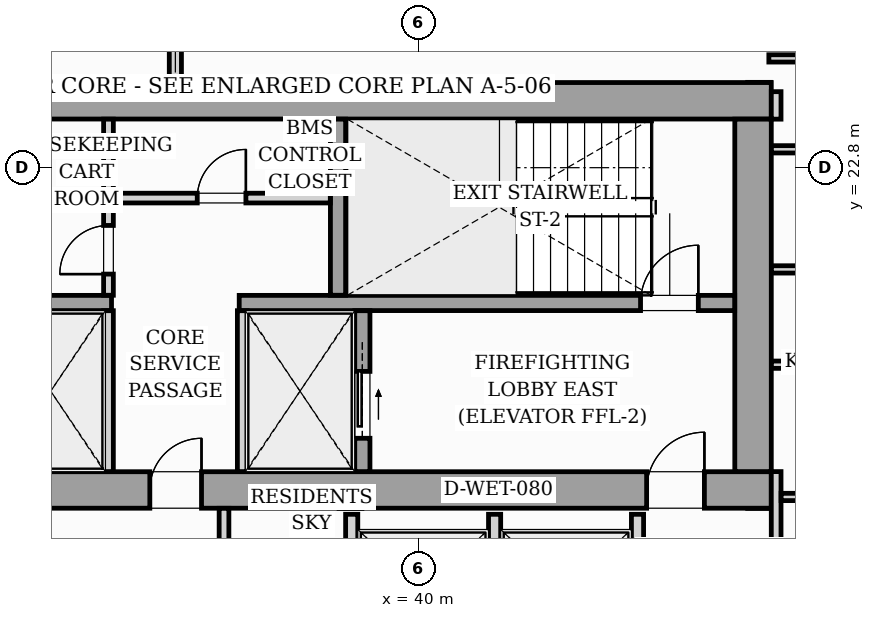
"""IFC4 building model, lengths in metres.
Left out: names, types, materials, properties, quantities, classifications, styles, units other than length and angle.
Written with IfcOpenShell. Run it as: python <this file> out.ifc"""

import sys

from ifc_helpers import new_model, si_unit, direction, frame, frame_2d, origin, origin_2d, place, context, subcontext, project, spatial, rectangle, i_section, extrude, source, transform, mapped, element, fill, save


model = new_model("IFC4")
c1 = context("Model", 3, precision=1e-05, world=origin(), true_north=direction((0.0, 1.0)))
c2 = subcontext(c1, "Body", "Model", "MODEL_VIEW")
j1 = project(units=[si_unit("LENGTHUNIT", "METRE"), si_unit("PLANEANGLEUNIT", "RADIAN")], contexts=[c1])
p1 = place(None, origin())
s1 = spatial("IfcSite", under=j1, at=p1, CompositionType="ELEMENT")
p2 = place(p1, origin())
s2 = spatial("IfcBuilding", under=s1, at=p2, CompositionType="ELEMENT")
p3 = place(p2, frame((0.0, 0.0, 198.6)))
s3 = spatial("IfcBuildingStorey", under=s2, at=p3, CompositionType="ELEMENT", Elevation=198.6)
m1 = source(origin(), c2, "Body", "SweptSolid", [
    extrude(i_section(OverallWidth=0.416, OverallDepth=0.446, WebThickness=0.039, FlangeThickness=0.063, FilletRadius=0.018, at=origin_2d()), origin(), (0.0, 0.0, 1.0), 3.196),
])
for number, where, z_axis, x_axis in (
    (1, (38.88, 17.4, 0.002), (0.0, 0.0, 1.0), (1.0, 0.0, 0.0)),
    (2, (45.6, 17.4, 0.002), (0.0, 0.0, 1.0), (1.0, 0.0, 0.0)),
    (3, (38.88, 24.0, 0.002), (0.0, 0.0, 1.0), (1.0, 0.0, 0.0)),
    (4, (45.6, 24.0, 0.002), (0.0, 0.0, 1.0), (1.0, 0.0, 0.0)),
):
    element("IfcColumn", number, at=place(p3, frame(where, z_axis=z_axis, x_axis=x_axis)), inside=s3, PredefinedType="PILASTER", context=c2, shape_type="MappedRepresentation", body=[
        mapped(m1, transform((0.0, 0.0, 0.0), scale=1.0)),
    ])
p4 = place(p3, frame((26.2, 17.5, 0.0), z_axis=(0.0, 0.0, 1.0), x_axis=(1.0, 0.0, 0.0)))
e5 = element("IfcWall", 5, at=p4, inside=s3, PredefinedType="SHEAR", context=c2, shape_type="SweptSolid", body=[
    extrude(rectangle(XDim=19.6, YDim=0.6, at=frame_2d((9.8, 0.0))), origin(), (0.0, 0.0, 1.0), 3.2),
])
p5 = place(p4, frame((0.95, 0.0, 0.0)))
e6 = element("IfcOpeningElement", 6, at=p5, cuts=e5, PredefinedType="OPENING", context=c2, shape_type="SweptSolid", body=[
    extrude(rectangle(XDim=0.95, YDim=2.06, at=frame_2d((0.475, 1.03))), frame((0.0, 0.31, 0.0), z_axis=(0.0, -1.0, 0.0), x_axis=(1.0, 0.0, 0.0)), (0.0, 0.0, 1.0), 0.62),
])
p6 = place(p4, frame((9.38, 0.0, 0.0)))
e7 = element("IfcOpeningElement", 7, at=p6, cuts=e5, PredefinedType="OPENING", context=c2, shape_type="SweptSolid", body=[
    extrude(rectangle(XDim=0.85, YDim=2.0, at=frame_2d((0.425, 1.0))), frame((0.0, 0.31, 0.0), z_axis=(0.0, -1.0, 0.0), x_axis=(1.0, 0.0, 0.0)), (0.0, 0.0, 1.0), 0.62),
])
p7 = place(p4, frame((17.55, 0.0, 0.0)))
e8 = element("IfcOpeningElement", 8, at=p7, cuts=e5, PredefinedType="OPENING", context=c2, shape_type="SweptSolid", body=[
    extrude(rectangle(XDim=0.95, YDim=2.06, at=frame_2d((0.475, 1.03))), frame((0.0, 0.31, 0.0), z_axis=(0.0, -1.0, 0.0), x_axis=(1.0, 0.0, 0.0)), (0.0, 0.0, 1.0), 0.62),
])
p8 = place(p3, frame((26.2, 23.9, 0.0), z_axis=(0.0, 0.0, 1.0), x_axis=(1.0, 0.0, 0.0)))
e9 = element("IfcWall", 9, at=p8, inside=s3, PredefinedType="SHEAR", context=c2, shape_type="SweptSolid", body=[
    extrude(rectangle(XDim=19.6, YDim=0.6, at=frame_2d((9.8, 0.0))), origin(), (0.0, 0.0, 1.0), 3.2),
])
p9 = place(p3, frame((45.5, 17.802, 0.0), z_axis=(0.0, 0.0, 1.0), x_axis=(0.0, 1.0, 0.0)))
e10 = element("IfcWall", 10, at=p9, inside=s3, PredefinedType="SHEAR", context=c2, shape_type="SweptSolid", body=[
    extrude(rectangle(XDim=5.796, YDim=0.6, at=frame_2d((2.898, 0.0))), origin(), (0.0, 0.0, 1.0), 3.2),
])
p10 = place(p3, frame((26.802, 20.575, 0.0), z_axis=(0.0, 0.0, 1.0), x_axis=(1.0, 0.0, 0.0)))
e11 = element("IfcWall", 11, at=p10, inside=s3, PredefinedType="SOLIDWALL", context=c2, shape_type="SweptSolid", body=[
    extrude(rectangle(XDim=8.148, YDim=0.25, at=frame_2d((4.074, 0.0))), origin(), (0.0, 0.0, 1.0), 3.2),
])
p11 = place(p10, frame((0.298, 0.0, 0.0)))
e12 = element("IfcOpeningElement", 12, at=p11, cuts=e11, PredefinedType="OPENING", context=c2, shape_type="SweptSolid", body=[
    extrude(rectangle(XDim=0.95, YDim=2.06, at=frame_2d((0.475, 1.03))), frame((0.0, 0.135, 0.0), z_axis=(0.0, -1.0, 0.0), x_axis=(1.0, 0.0, 0.0)), (0.0, 0.0, 1.0), 0.27),
])
p12 = place(p3, frame((37.05, 20.575, 0.0), z_axis=(0.0, 0.0, 1.0), x_axis=(1.0, 0.0, 0.0)))
e13 = element("IfcWall", 13, at=p12, inside=s3, PredefinedType="SOLIDWALL", context=c2, shape_type="SweptSolid", body=[
    extrude(rectangle(XDim=8.148, YDim=0.25, at=frame_2d((4.074, 0.0))), origin(), (0.0, 0.0, 1.0), 3.2),
])
p13 = place(p12, frame((6.6, 0.0, 0.0)))
e14 = element("IfcOpeningElement", 14, at=p13, cuts=e13, PredefinedType="OPENING", context=c2, shape_type="SweptSolid", body=[
    extrude(rectangle(XDim=0.95, YDim=2.06, at=frame_2d((0.475, 1.03))), frame((0.0, 0.135, 0.0), z_axis=(0.0, -1.0, 0.0), x_axis=(1.0, 0.0, 0.0)), (0.0, 0.0, 1.0), 0.27),
])
p14 = place(p3, frame((38.675, 20.702, 0.0), z_axis=(0.0, 0.0, 1.0), x_axis=(0.0, 1.0, 0.0)))
e15 = element("IfcWall", 15, at=p14, inside=s3, PredefinedType="SOLIDWALL", context=c2, shape_type="SweptSolid", body=[
    extrude(rectangle(XDim=2.896, YDim=0.25, at=frame_2d((1.448, 0.0))), origin(), (0.0, 0.0, 1.0), 3.2),
])
for number, where, z_axis, x_axis in (
    (16, (34.9, 17.802, 0.0), (0.0, 0.0, 1.0), (0.0, 1.0, 0.0)),
    (17, (37.1, 17.802, 0.0), (0.0, 0.0, 1.0), (0.0, 1.0, 0.0)),
):
    element("IfcWall", number, at=place(p3, frame(where, z_axis=z_axis, x_axis=x_axis)), inside=s3, PredefinedType="PARTITIONING", context=c2, shape_type="SweptSolid", body=[
        extrude(rectangle(XDim=2.646, YDim=0.16, at=frame_2d((1.323, 0.0))), origin(), (0.0, 0.0, 1.0), 2.94),
    ])
p15 = place(p3, frame((39.075, 17.802, 0.0), z_axis=(0.0, 0.0, 1.0), x_axis=(0.0, 1.0, 0.0)))
e18 = element("IfcWall", 18, at=p15, inside=s3, PredefinedType="SOLIDWALL", context=c2, shape_type="SweptSolid", body=[
    extrude(rectangle(XDim=2.646, YDim=0.25, at=frame_2d((1.323, 0.0))), origin(), (0.0, 0.0, 1.0), 3.2),
])
p16 = place(p15, frame((0.548, 0.0, 0.0)))
e19 = element("IfcOpeningElement", 19, at=p16, cuts=e18, PredefinedType="OPENING", context=c2, shape_type="SweptSolid", body=[
    extrude(rectangle(XDim=1.1, YDim=2.08, at=frame_2d((0.55, 1.04))), frame((0.0, 0.135, 0.0), z_axis=(0.0, -1.0, 0.0), x_axis=(1.0, 0.0, 0.0)), (0.0, 0.0, 1.0), 0.27),
])
p17 = place(p3, frame((34.9, 20.702, 0.0), z_axis=(0.0, 0.0, 1.0), x_axis=(0.0, 1.0, 0.0)))
e20 = element("IfcWall", 20, at=p17, inside=s3, PredefinedType="PARTITIONING", context=c2, shape_type="SweptSolid", body=[
    extrude(rectangle(XDim=2.896, YDim=0.16, at=frame_2d((1.448, 0.0))), origin(), (0.0, 0.0, 1.0), 2.94),
])
p18 = place(p17, frame((0.348, 0.0, 0.0)))
e21 = element("IfcOpeningElement", 21, at=p18, cuts=e20, PredefinedType="OPENING", context=c2, shape_type="SweptSolid", body=[
    extrude(rectangle(XDim=0.8, YDim=2.05, at=frame_2d((0.4, 1.025))), frame((0.0, 0.09, 0.0), z_axis=(0.0, -1.0, 0.0), x_axis=(1.0, 0.0, 0.0)), (0.0, 0.0, 1.0), 0.18),
])
p19 = place(p3, frame((34.982, 22.3, 0.0), z_axis=(0.0, 0.0, 1.0), x_axis=(1.0, 0.0, 0.0)))
e22 = element("IfcWall", 22, at=p19, inside=s3, PredefinedType="PARTITIONING", context=c2, shape_type="SweptSolid", body=[
    extrude(rectangle(XDim=3.566, YDim=0.16, at=frame_2d((1.783, 0.0))), origin(), (0.0, 0.0, 1.0), 2.94),
])
p20 = place(p19, frame((1.378, 0.0, 0.0)))
e23 = element("IfcOpeningElement", 23, at=p20, cuts=e22, PredefinedType="OPENING", context=c2, shape_type="SweptSolid", body=[
    extrude(rectangle(XDim=0.8, YDim=2.05, at=frame_2d((0.4, 1.025))), frame((0.0, 0.09, 0.0), z_axis=(0.0, -1.0, 0.0), x_axis=(1.0, 0.0, 0.0)), (0.0, 0.0, 1.0), 0.18),
])
for number, where, z_axis, x_axis in (
    (24, (38.9, 14.75, 0.0), (0.0, 0.0, 1.0), (0.0, 1.0, 0.0)),
    (25, (41.25, 14.75, 0.0), (0.0, 0.0, 1.0), (0.0, 1.0, 0.0)),
    (26, (43.6, 14.75, 0.0), (0.0, 0.0, 1.0), (0.0, 1.0, 0.0)),
):
    element("IfcWall", number, at=place(p3, frame(where, z_axis=z_axis, x_axis=x_axis)), inside=s3, PredefinedType="PARTITIONING", context=c2, shape_type="SweptSolid", body=[
        extrude(rectangle(XDim=2.35, YDim=0.2, at=frame_2d((1.175, 0.0))), origin(), (0.0, 0.0, 1.0), 2.94),
    ])
p21 = place(p3, frame((45.88, 13.442, 0.0), z_axis=(0.0, 0.0, 1.0), x_axis=(0.0, 1.0, 0.0)))
e27 = element("IfcWall", 27, at=p21, inside=s3, PredefinedType="PARTITIONING", context=c2, shape_type="SweptSolid", body=[
    extrude(rectangle(XDim=4.36, YDim=0.16, at=frame_2d((2.18, 0.0))), origin(), (0.0, 0.0, 1.0), 2.94),
])
p22 = place(p21, frame((0.493, 0.0, 0.0)))
e28 = element("IfcOpeningElement", 28, at=p22, cuts=e27, PredefinedType="OPENING", context=c2, shape_type="SweptSolid", body=[
    extrude(rectangle(XDim=0.95, YDim=2.06, at=frame_2d((0.475, 1.03))), frame((0.0, 0.09, 0.0), z_axis=(0.0, -1.0, 0.0), x_axis=(1.0, 0.0, 0.0)), (0.0, 0.0, 1.0), 0.18),
])
p23 = place(p3, frame((45.88, 23.598, 0.0), z_axis=(0.0, 0.0, 1.0), x_axis=(0.0, 1.0, 0.0)))
e29 = element("IfcWall", 29, at=p23, inside=s3, PredefinedType="PARTITIONING", context=c2, shape_type="SweptSolid", body=[
    extrude(rectangle(XDim=0.452, YDim=0.16, at=frame_2d((0.226, 0.0))), origin(), (0.0, 0.0, 1.0), 2.94),
])
p24 = place(p3, frame((36.0, 24.202, 0.0), z_axis=(0.0, 0.0, 1.0), x_axis=(0.0, 1.0, 0.0)))
e30 = element("IfcWall", 30, at=p24, inside=s3, PredefinedType="PARTITIONING", context=c2, shape_type="SweptSolid", body=[
    extrude(rectangle(XDim=2.152, YDim=0.2, at=frame_2d((1.076, 0.0))), origin(), (0.0, 0.0, 1.0), 2.94),
])
p25 = place(p3, frame((45.962, 17.385, 0.0), z_axis=(0.0, 0.0, 1.0), x_axis=(1.0, 0.0, 0.0)))
e31 = element("IfcWall", 31, at=p25, inside=s3, PredefinedType="PARTITIONING", context=c2, shape_type="SweptSolid", body=[
    extrude(rectangle(XDim=2.256, YDim=0.12, at=frame_2d((1.128, 0.0))), origin(), (0.0, 0.0, 1.0), 2.281),
])
p26 = place(p3, frame((45.802, 19.56, 0.0), z_axis=(0.0, 0.0, 1.0), x_axis=(1.0, 0.0, 0.0)))
e32 = element("IfcWall", 32, at=p26, inside=s3, PredefinedType="PARTITIONING", context=c2, shape_type="SweptSolid", body=[
    extrude(rectangle(XDim=2.416, YDim=0.12, at=frame_2d((1.208, 0.0))), origin(), (0.0, 0.0, 1.0), 2.94),
])
p27 = place(p3, frame((45.76, 24.597, 0.0), z_axis=(0.0, 0.0, 1.0), x_axis=(1.0, 0.0, 0.0)))
e33 = element("IfcWall", 33, at=p27, inside=s3, PredefinedType="PARTITIONING", context=c2, shape_type="SweptSolid", body=[
    extrude(rectangle(XDim=18.294, YDim=0.12, at=frame_2d((9.147, 0.0))), origin(), (0.0, 0.0, 1.0), 2.94),
])
p28 = place(p27, frame((6.388, 0.0, 0.0)))
e34 = element("IfcOpeningElement", 34, at=p28, cuts=e33, PredefinedType="OPENING", context=c2, shape_type="SweptSolid", body=[
    extrude(rectangle(XDim=0.85, YDim=2.05, at=frame_2d((0.425, 1.025))), frame((0.0, 0.07, 0.0), z_axis=(0.0, -1.0, 0.0), x_axis=(1.0, 0.0, 0.0)), (0.0, 0.0, 1.0), 0.14),
])
p29 = place(p3, frame((45.802, 23.102, 0.0), z_axis=(0.0, 0.0, 1.0), x_axis=(1.0, 0.0, 0.0)))
e35 = element("IfcWall", 35, at=p29, inside=s3, PredefinedType="PARTITIONING", context=c2, shape_type="SweptSolid", body=[
    extrude(rectangle(XDim=18.396, YDim=0.12, at=frame_2d((9.198, 0.0))), origin(), (0.0, 0.0, 1.0), 2.94),
])
p30 = place(p29, frame((6.346, 0.0, 0.0)))
e36 = element("IfcOpeningElement", 36, at=p30, cuts=e35, PredefinedType="OPENING", context=c2, shape_type="SweptSolid", body=[
    extrude(rectangle(XDim=0.85, YDim=2.05, at=frame_2d((0.425, 1.025))), frame((0.0, 0.07, 0.0), z_axis=(0.0, -1.0, 0.0), x_axis=(1.0, 0.0, 0.0)), (0.0, 0.0, 1.0), 0.14),
])
p31 = place(p3, frame((45.802, 21.127, 0.0), z_axis=(0.0, 0.0, 1.0), x_axis=(1.0, 0.0, 0.0)))
e37 = element("IfcWall", 37, at=p31, inside=s3, PredefinedType="PARTITIONING", context=c2, shape_type="SweptSolid", body=[
    extrude(rectangle(XDim=18.586, YDim=0.12, at=frame_2d((9.293, 0.0))), origin(), (0.0, 0.0, 1.0), 2.94),
])
p32 = place(p31, frame((8.954, 0.0, 0.0)))
e38 = element("IfcOpeningElement", 38, at=p32, cuts=e37, PredefinedType="OPENING", context=c2, shape_type="SweptSolid", body=[
    extrude(rectangle(XDim=0.85, YDim=2.05, at=frame_2d((0.425, 1.025))), frame((0.0, 0.07, 0.0), z_axis=(0.0, -1.0, 0.0), x_axis=(1.0, 0.0, 0.0)), (0.0, 0.0, 1.0), 0.14),
])
p33 = place(p3, frame((36.8, 14.7, 0.0), z_axis=(0.0, 0.0, 1.0), x_axis=(0.0, 1.0, 0.0)))
e39 = element("IfcWall", 39, at=p33, inside=s3, PredefinedType="PARTITIONING", context=c2, shape_type="SweptSolid", body=[
    extrude(rectangle(XDim=2.498, YDim=0.16, at=frame_2d((1.249, 0.0))), origin(), (0.0, 0.0, 1.0), 2.94),
])
m2 = source(origin(), c2, "Body", "SweptSolid", [
    extrude(rectangle(XDim=0.85, YDim=2.0, at=frame_2d((0.425, 1.0))), frame((0.0, 0.025, 0.0), z_axis=(0.0, -1.0, 0.0), x_axis=(1.0, 0.0, 0.0)), (0.0, 0.0, 1.0), 0.05),
])
p34 = place(p6, origin())
e40 = element("IfcDoor", 40, at=p34, inside=s3, OperationType="SINGLE_SWING_RIGHT", PredefinedType="DOOR", context=c2, shape_type="MappedRepresentation", body=[
    mapped(m2, transform((0.0, 0.0, 0.0), scale=1.0)),
])
fill(e7, e40)
m3 = source(origin(), c2, "Body", "SweptSolid", [
    extrude(rectangle(XDim=0.95, YDim=2.06, at=frame_2d((0.475, 1.03))), frame((0.0, 0.025, 0.0), z_axis=(0.0, -1.0, 0.0), x_axis=(1.0, 0.0, 0.0)), (0.0, 0.0, 1.0), 0.05),
])
p35 = place(p7, origin())
e41 = element("IfcDoor", 41, at=p35, inside=s3, OperationType="SINGLE_SWING_RIGHT", PredefinedType="DOOR", context=c2, shape_type="MappedRepresentation", body=[
    mapped(m3, transform((0.0, 0.0, 0.0), scale=1.0)),
])
fill(e8, e41)
p36 = place(p13, origin())
e42 = element("IfcDoor", 42, at=p36, inside=s3, OperationType="SINGLE_SWING_RIGHT", PredefinedType="DOOR", context=c2, shape_type="MappedRepresentation", body=[
    mapped(m3, transform((0.0, 0.0, 0.0), scale=1.0)),
])
fill(e14, e42)
m4 = source(origin(), c2, "Body", "SweptSolid", [
    extrude(rectangle(XDim=1.1, YDim=2.08, at=frame_2d((0.55, 1.04))), frame((0.0, 0.025, 0.0), z_axis=(0.0, -1.0, 0.0), x_axis=(1.0, 0.0, 0.0)), (0.0, 0.0, 1.0), 0.05),
])
p37 = place(p16, origin())
e43 = element("IfcDoor", 43, at=p37, inside=s3, OperationType="SLIDING_TO_RIGHT", PredefinedType="DOOR", context=c2, shape_type="MappedRepresentation", body=[
    mapped(m4, transform((0.0, 0.0, 0.0), scale=1.0)),
])
fill(e19, e43)
m5 = source(origin(), c2, "Body", "SweptSolid", [
    extrude(rectangle(XDim=0.8, YDim=2.05, at=frame_2d((0.4, 1.025))), frame((0.0, 0.025, 0.0), z_axis=(0.0, -1.0, 0.0), x_axis=(1.0, 0.0, 0.0)), (0.0, 0.0, 1.0), 0.05),
])
p38 = place(p18, origin())
e44 = element("IfcDoor", 44, at=p38, inside=s3, OperationType="SINGLE_SWING_LEFT", PredefinedType="DOOR", context=c2, shape_type="MappedRepresentation", body=[
    mapped(m5, transform((0.0, 0.0, 0.0), scale=1.0)),
])
fill(e21, e44)
p39 = place(p20, origin())
e45 = element("IfcDoor", 45, at=p39, inside=s3, OperationType="SINGLE_SWING_RIGHT", PredefinedType="DOOR", context=c2, shape_type="MappedRepresentation", body=[
    mapped(m5, transform((0.0, 0.0, 0.0), scale=1.0)),
])
fill(e23, e45)
save(model, sys.argv[1])
